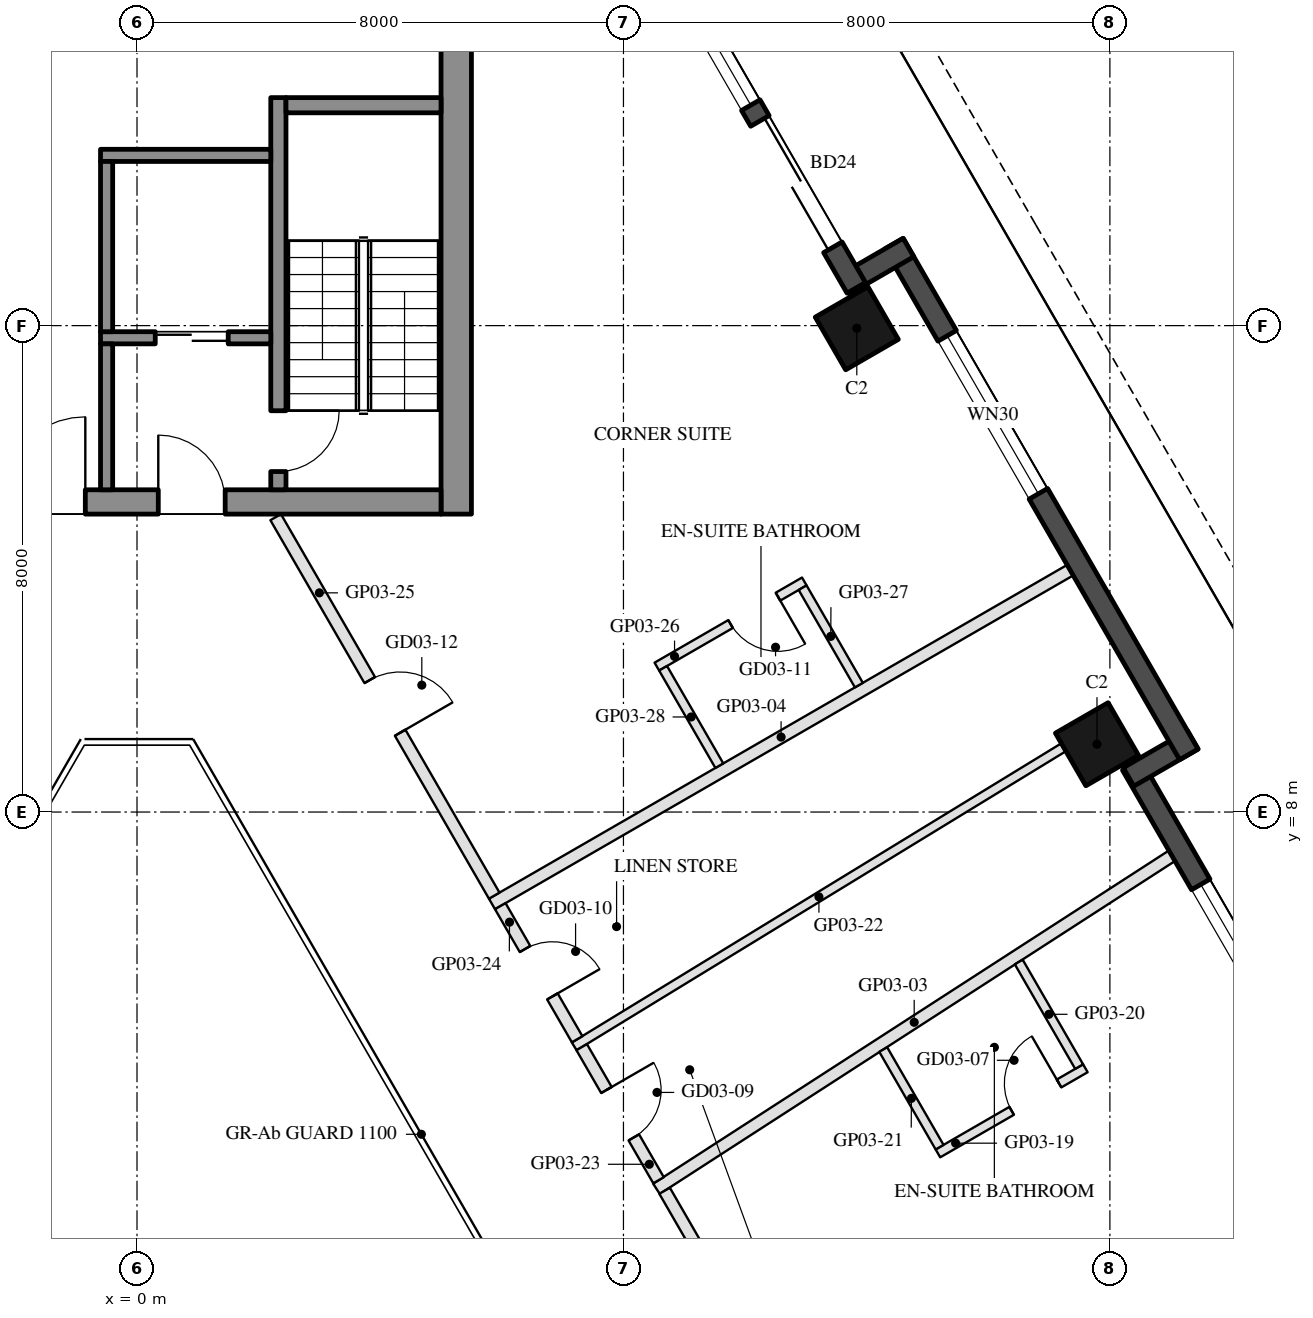
"""IFC4 building model, lengths in metres.
Left out: names, types, materials, properties, quantities, classifications, styles, units other than length and angle.
Written with IfcOpenShell. Run it as: python <this file> out.ifc"""

import sys

from ifc_helpers import new_model, si_unit, direction, frame, frame_2d, origin, origin_2d, place, context, subcontext, project, spatial, rectangle, hollow_rectangle, extrude, element, fill, save


model = new_model("IFC4")
c1 = context("Model", 3, precision=1e-05, world=origin(), true_north=direction((0.0, 1.0)))
c2 = subcontext(c1, "Body", "Model", "MODEL_VIEW")
j1 = project(units=[si_unit("LENGTHUNIT", "METRE"), si_unit("PLANEANGLEUNIT", "RADIAN")], contexts=[c1])
p1 = place(None, origin())
s1 = spatial("IfcSite", under=j1, at=p1, CompositionType="ELEMENT")
p2 = place(p1, origin())
s2 = spatial("IfcBuilding", under=s1, at=p2, CompositionType="ELEMENT")
p3 = place(p2, frame((0.0, 0.0, 61.3)))
s3 = spatial("IfcBuildingStorey", under=s2, at=p3, CompositionType="ELEMENT", Elevation=61.3)
for number, where, z_axis, x_axis in (
    (1, (15.788, 9.115, 0.0), (0.0, 0.0, 1.0), (-0.5, 0.866, 0.0)),
    (2, (11.838, 15.957, 0.0), (0.0, 0.0, 1.0), (-0.5, 0.866, 0.0)),
):
    element("IfcColumn", number, at=place(p3, frame(where, z_axis=z_axis, x_axis=x_axis)), inside=s3, PredefinedType="COLUMN", context=c2, shape_type="SweptSolid", body=[
        extrude(hollow_rectangle(XDim=1.0, YDim=1.0, WallThickness=0.045, at=origin_2d()), origin(), (0.0, 0.0, 1.0), 3.7),
    ])
p4 = place(p3, frame((19.729, 2.938, 0.0), z_axis=(0.0, 0.0, 1.0), x_axis=(-0.499976430342, 0.866039011305, 0.0)))
e3 = element("IfcWall", 3, at=p4, inside=s3, PredefinedType="SOLIDWALL", context=c2, shape_type="SweptSolid", body=[
    extrude(rectangle(XDim=6.74, YDim=0.35, at=frame_2d((3.37, 0.0))), origin(), (0.0, 0.0, 1.0), 3.55),
])
p5 = place(p4, frame((0.77, 0.0, 0.3)))
e4 = element("IfcOpeningElement", 4, at=p5, cuts=e3, PredefinedType="OPENING", context=c2, shape_type="SweptSolid", body=[
    extrude(rectangle(XDim=1.7, YDim=2.65, at=frame_2d((0.85, 1.325))), frame((0.0, 0.185, 0.0), z_axis=(0.0, -1.0, 0.0), x_axis=(1.0, 0.0, 0.0)), (0.0, 0.0, 1.0), 0.37),
])
p6 = place(p4, frame((2.77, 0.0, 0.3)))
e5 = element("IfcOpeningElement", 5, at=p6, cuts=e3, PredefinedType="OPENING", context=c2, shape_type="SweptSolid", body=[
    extrude(rectangle(XDim=1.7, YDim=2.65, at=frame_2d((0.85, 1.325))), frame((0.0, 0.185, 0.0), z_axis=(0.0, -1.0, 0.0), x_axis=(1.0, 0.0, 0.0)), (0.0, 0.0, 1.0), 0.37),
])
p7 = place(p3, frame((16.306, 8.577, 0.0), z_axis=(0.0, 0.0, 1.0), x_axis=(0.866092288191, 0.499884134912, 0.0)))
e6 = element("IfcWall", 6, at=p7, inside=s3, PredefinedType="SOLIDWALL", context=c2, shape_type="SweptSolid", body=[
    extrude(rectangle(XDim=1.22, YDim=0.35, at=frame_2d((0.61, 0.0))), origin(), (0.0, 0.0, 1.0), 3.55),
])
p8 = place(p3, frame((17.299, 8.948, 0.0), z_axis=(0.0, 0.0, 1.0), x_axis=(-0.500010041276, 0.866019606374, 0.0)))
e7 = element("IfcWall", 7, at=p8, inside=s3, PredefinedType="SOLIDWALL", context=c2, shape_type="SweptSolid", body=[
    extrude(rectangle(XDim=9.7, YDim=0.35, at=frame_2d((4.85, 0.0))), origin(), (0.0, 0.0, 1.0), 3.55),
])
p9 = place(p8, frame((4.949, 0.0, 0.3)))
e8 = element("IfcOpeningElement", 8, at=p9, cuts=e7, PredefinedType="OPENING", context=c2, shape_type="SweptSolid", body=[
    extrude(rectangle(XDim=3.0, YDim=2.65, at=frame_2d((1.5, 1.325))), frame((0.0, 0.185, 0.0), z_axis=(0.0, -1.0, 0.0), x_axis=(1.0, 0.0, 0.0)), (0.0, 0.0, 1.0), 0.37),
])
p10 = place(p3, frame((12.688, 17.284, 0.0), z_axis=(0.0, 0.0, 1.0), x_axis=(-0.865955602162, -0.500120880472, 0.0)))
e9 = element("IfcWall", 9, at=p10, inside=s3, PredefinedType="SOLIDWALL", context=c2, shape_type="SweptSolid", body=[
    extrude(rectangle(XDim=1.22, YDim=0.35, at=frame_2d((0.61, 0.0))), origin(), (0.0, 0.0, 1.0), 3.55),
])
p11 = place(p3, frame((11.829, 16.621, 0.0), z_axis=(0.0, 0.0, 1.0), x_axis=(-0.500003597184, 0.866023326939, 0.0)))
e10 = element("IfcWall", 10, at=p11, inside=s3, PredefinedType="SOLIDWALL", context=c2, shape_type="SweptSolid", body=[
    extrude(rectangle(XDim=6.74, YDim=0.35, at=frame_2d((3.37, 0.0))), origin(), (0.0, 0.0, 1.0), 3.55),
])
p12 = place(p11, frame((0.77, 0.0, 0.0)))
e11 = element("IfcOpeningElement", 11, at=p12, cuts=e10, PredefinedType="OPENING", context=c2, shape_type="SweptSolid", body=[
    extrude(rectangle(XDim=2.4, YDim=2.4, at=frame_2d((1.2, 1.2))), frame((0.0, 0.185, 0.0), z_axis=(0.0, -1.0, 0.0), x_axis=(1.0, 0.0, 0.0)), (0.0, 0.0, 1.0), 0.37),
])
p13 = place(p11, frame((3.47, 0.0, 0.3)))
e12 = element("IfcOpeningElement", 12, at=p13, cuts=e10, PredefinedType="OPENING", context=c2, shape_type="SweptSolid", body=[
    extrude(rectangle(XDim=2.9, YDim=2.65, at=frame_2d((1.45, 1.325))), frame((0.0, 0.185, 0.0), z_axis=(0.0, -1.0, 0.0), x_axis=(1.0, 0.0, 0.0)), (0.0, 0.0, 1.0), 0.37),
])
p14 = place(p3, frame((5.25, 12.9, 0.0), z_axis=(0.0, 0.0, 1.0), x_axis=(0.0, 1.0, 0.0)))
e13 = element("IfcWall", 13, at=p14, inside=s3, PredefinedType="SHEAR", context=c2, shape_type="SweptSolid", body=[
    extrude(rectangle(XDim=14.837, YDim=0.5, at=frame_2d((7.418, 0.0))), origin(), (0.0, 0.0, 1.0), 3.5),
])
p15 = place(p3, frame((5.0, 13.1, 0.0), z_axis=(0.0, 0.0, 1.0), x_axis=(-1.0, 0.0, 0.0)))
e14 = element("IfcWall", 14, at=p15, inside=s3, PredefinedType="SHEAR", context=c2, shape_type="SweptSolid", body=[
    extrude(rectangle(XDim=10.0, YDim=0.4, at=frame_2d((5.0, 0.0))), origin(), (0.0, 0.0, 1.0), 3.5),
])
p16 = place(p15, frame((3.55, 0.0, 0.0)))
e15 = element("IfcOpeningElement", 15, at=p16, cuts=e14, PredefinedType="OPENING", context=c2, shape_type="SweptSolid", body=[
    extrude(rectangle(XDim=1.1, YDim=2.1, at=frame_2d((0.55, 1.05))), frame((0.0, 0.21, 0.0), z_axis=(0.0, -1.0, 0.0), x_axis=(1.0, 0.0, 0.0)), (0.0, 0.0, 1.0), 0.42),
])
p17 = place(p15, frame((5.85, 0.0, 0.0)))
e16 = element("IfcOpeningElement", 16, at=p17, cuts=e14, PredefinedType="OPENING", context=c2, shape_type="SweptSolid", body=[
    extrude(rectangle(XDim=1.4, YDim=2.1, at=frame_2d((0.7, 1.05))), frame((0.0, 0.21, 0.0), z_axis=(0.0, -1.0, 0.0), x_axis=(1.0, 0.0, 0.0)), (0.0, 0.0, 1.0), 0.42),
])
p18 = place(p3, frame((2.325, 13.3, 0.0), z_axis=(0.0, 0.0, 1.0), x_axis=(0.0, 1.0, 0.0)))
e17 = element("IfcWall", 17, at=p18, inside=s3, PredefinedType="SHEAR", context=c2, shape_type="SweptSolid", body=[
    extrude(rectangle(XDim=6.45, YDim=0.25, at=frame_2d((3.225, 0.0))), origin(), (0.0, 0.0, 1.0), 3.5),
])
p19 = place(p18, frame((0.3, 0.0, 0.0)))
e18 = element("IfcOpeningElement", 18, at=p19, cuts=e17, PredefinedType="OPENING", context=c2, shape_type="SweptSolid", body=[
    extrude(rectangle(XDim=1.0, YDim=2.1, at=frame_2d((0.5, 1.05))), frame((0.0, 0.135, 0.0), z_axis=(0.0, -1.0, 0.0), x_axis=(1.0, 0.0, 0.0)), (0.0, 0.0, 1.0), 0.27),
])
p20 = place(p3, frame((5.0, 19.625, 0.0), z_axis=(0.0, 0.0, 1.0), x_axis=(-1.0, 0.0, 0.0)))
e19 = element("IfcWall", 19, at=p20, inside=s3, PredefinedType="SHEAR", context=c2, shape_type="SweptSolid", body=[
    extrude(rectangle(XDim=2.55, YDim=0.25, at=frame_2d((1.275, 0.0))), origin(), (0.0, 0.0, 1.0), 3.5),
])
p21 = place(p3, frame((2.2, 18.8, 0.0), z_axis=(0.0, 0.0, 1.0), x_axis=(-1.0, 0.0, 0.0)))
e20 = element("IfcWall", 20, at=p21, inside=s3, PredefinedType="SHEAR", context=c2, shape_type="SweptSolid", body=[
    extrude(rectangle(XDim=2.8, YDim=0.2, at=frame_2d((1.4, 0.0))), origin(), (0.0, 0.0, 1.0), 3.5),
])
p22 = place(p3, frame((2.2, 15.8, 0.0), z_axis=(0.0, 0.0, 1.0), x_axis=(-1.0, 0.0, 0.0)))
e21 = element("IfcWall", 21, at=p22, inside=s3, PredefinedType="SHEAR", context=c2, shape_type="SweptSolid", body=[
    extrude(rectangle(XDim=2.8, YDim=0.2, at=frame_2d((1.4, 0.0))), origin(), (0.0, 0.0, 1.0), 3.5),
])
p23 = place(p22, frame((0.7, 0.0, 0.0)))
e22 = element("IfcOpeningElement", 22, at=p23, cuts=e21, PredefinedType="OPENING", context=c2, shape_type="SweptSolid", body=[
    extrude(rectangle(XDim=1.2, YDim=2.1, at=frame_2d((0.6, 1.05))), frame((0.0, 0.11, 0.0), z_axis=(0.0, -1.0, 0.0), x_axis=(1.0, 0.0, 0.0)), (0.0, 0.0, 1.0), 0.22),
])
p24 = place(p3, frame((-0.5, 15.9, 0.0), z_axis=(0.0, 0.0, 1.0), x_axis=(0.0, 1.0, 0.0)))
e23 = element("IfcWall", 23, at=p24, inside=s3, PredefinedType="SHEAR", context=c2, shape_type="SweptSolid", body=[
    extrude(rectangle(XDim=2.8, YDim=0.2, at=frame_2d((1.4, 0.0))), origin(), (0.0, 0.0, 1.0), 3.5),
])
p25 = place(p3, frame((-0.5, 13.3, 0.0), z_axis=(0.0, 0.0, 1.0), x_axis=(0.0, 1.0, 0.0)))
e24 = element("IfcWall", 24, at=p25, inside=s3, PredefinedType="SHEAR", context=c2, shape_type="SweptSolid", body=[
    extrude(rectangle(XDim=2.4, YDim=0.2, at=frame_2d((1.2, 0.0))), origin(), (0.0, 0.0, 1.0), 3.5),
])
p26 = place(p3, frame((17.02, 7.28, 0.0), z_axis=(0.0, 0.0, 1.0), x_axis=(-0.839924980805, -0.542702521294, 0.0)))
e25 = element("IfcWall", 25, at=p26, inside=s3, PredefinedType="PARTITIONING", context=c2, shape_type="SweptSolid", body=[
    extrude(rectangle(XDim=10.093, YDim=0.2, at=frame_2d((5.046, 0.0))), origin(), (0.0, 0.0, 1.0), 2.96),
])
p27 = place(p3, frame((15.347, 11.978, 0.0), z_axis=(0.0, 0.0, 1.0), x_axis=(-0.866027479907, -0.499996404033, 0.0)))
e26 = element("IfcWall", 26, at=p27, inside=s3, PredefinedType="PARTITIONING", context=c2, shape_type="SweptSolid", body=[
    extrude(rectangle(XDim=10.98, YDim=0.2, at=frame_2d((5.49, 0.0))), origin(), (0.0, 0.0, 1.0), 2.96),
])
p28 = place(p3, frame((8.677, 1.771, 0.0), z_axis=(0.0, 0.0, 1.0), x_axis=(0.50000293509, -0.866023709203, 0.0)))
e27 = element("IfcWall", 27, at=p28, inside=s3, PredefinedType="PARTITIONING", context=c2, shape_type="SweptSolid", body=[
    extrude(rectangle(XDim=7.183, YDim=0.2, at=frame_2d((3.592, 0.0))), origin(), (0.0, 0.0, 1.0), 2.95),
])
p29 = place(p28, frame((3.092, 0.0, 0.0)))
e28 = element("IfcOpeningElement", 28, at=p29, cuts=e27, PredefinedType="OPENING", context=c2, shape_type="SweptSolid", body=[
    extrude(rectangle(XDim=1.0, YDim=2.1, at=frame_2d((0.5, 1.05))), frame((0.0, 0.11, 0.0), z_axis=(0.0, -1.0, 0.0), x_axis=(1.0, 0.0, 0.0)), (0.0, 0.0, 1.0), 0.22),
])
p30 = place(p3, frame((13.172, 2.386, 0.0), z_axis=(0.0, 0.0, 1.0), x_axis=(0.865996816683, 0.500049511043, 0.0)))
e29 = element("IfcWall", 29, at=p30, inside=s3, PredefinedType="PARTITIONING", context=c2, shape_type="SweptSolid", body=[
    extrude(rectangle(XDim=2.8, YDim=0.15, at=frame_2d((1.4, 0.0))), origin(), (0.0, 0.0, 1.0), 3.55),
])
p31 = place(p30, frame((1.4, 0.0, 0.0)))
e30 = element("IfcOpeningElement", 30, at=p31, cuts=e29, PredefinedType="OPENING", context=c2, shape_type="SweptSolid", body=[
    extrude(rectangle(XDim=0.9, YDim=2.1, at=frame_2d((0.45, 1.05))), frame((0.0, 0.085, 0.0), z_axis=(0.0, -1.0, 0.0), x_axis=(1.0, 0.0, 0.0)), (0.0, 0.0, 1.0), 0.17),
])
p32 = place(p3, frame((15.494, 3.813, 0.0), z_axis=(0.0, 0.0, 1.0), x_axis=(-0.499945861543, 0.866056658381, 0.0)))
e31 = element("IfcWall", 31, at=p32, inside=s3, PredefinedType="PARTITIONING", context=c2, shape_type="SweptSolid", body=[
    extrude(rectangle(XDim=1.987, YDim=0.15, at=frame_2d((0.993, 0.0))), origin(), (0.0, 0.0, 1.0), 2.95),
])
p33 = place(p3, frame((13.199, 2.488, 0.0), z_axis=(0.0, 0.0, 1.0), x_axis=(-0.499992292652, 0.866029853578, 0.0)))
e32 = element("IfcWall", 32, at=p33, inside=s3, PredefinedType="PARTITIONING", context=c2, shape_type="SweptSolid", body=[
    extrude(rectangle(XDim=1.854, YDim=0.15, at=frame_2d((0.927, 0.0))), origin(), (0.0, 0.0, 1.0), 2.95),
])
p34 = place(p3, frame((15.239, 9.065, 0.0), z_axis=(0.0, 0.0, 1.0), x_axis=(-0.853241525467, -0.521515962573, 0.0)))
e33 = element("IfcWall", 33, at=p34, inside=s3, PredefinedType="PARTITIONING", context=c2, shape_type="SweptSolid", body=[
    extrude(rectangle(XDim=9.433, YDim=0.15, at=frame_2d((4.716, 0.0))), origin(), (0.0, 0.0, 1.0), 2.95),
])
p35 = place(p3, frame((7.313, 4.133, 0.0), z_axis=(0.0, 0.0, 1.0), x_axis=(0.500003972934, -0.866023109998, 0.0)))
e34 = element("IfcWall", 34, at=p35, inside=s3, PredefinedType="PARTITIONING", context=c2, shape_type="SweptSolid", body=[
    extrude(rectangle(XDim=2.527, YDim=0.2, at=frame_2d((1.264, 0.0))), origin(), (0.0, 0.0, 1.0), 2.95),
])
p36 = place(p35, frame((0.814, 0.0, 0.0)))
e35 = element("IfcOpeningElement", 35, at=p36, cuts=e34, PredefinedType="OPENING", context=c2, shape_type="SweptSolid", body=[
    extrude(rectangle(XDim=0.9, YDim=2.1, at=frame_2d((0.45, 1.05))), frame((0.0, 0.11, 0.0), z_axis=(0.0, -1.0, 0.0), x_axis=(1.0, 0.0, 0.0)), (0.0, 0.0, 1.0), 0.22),
])
p37 = place(p3, frame((5.975, 6.452, 0.0), z_axis=(0.0, 0.0, 1.0), x_axis=(0.499962146402, -0.866047257466, 0.0)))
e36 = element("IfcWall", 36, at=p37, inside=s3, PredefinedType="PARTITIONING", context=c2, shape_type="SweptSolid", body=[
    extrude(rectangle(XDim=2.528, YDim=0.2, at=frame_2d((1.264, 0.0))), origin(), (0.0, 0.0, 1.0), 2.95),
])
p38 = place(p37, frame((0.814, 0.0, 0.0)))
e37 = element("IfcOpeningElement", 37, at=p38, cuts=e36, PredefinedType="OPENING", context=c2, shape_type="SweptSolid", body=[
    extrude(rectangle(XDim=0.9, YDim=2.1, at=frame_2d((0.45, 1.05))), frame((0.0, 0.11, 0.0), z_axis=(0.0, -1.0, 0.0), x_axis=(1.0, 0.0, 0.0)), (0.0, 0.0, 1.0), 0.22),
])
p39 = place(p3, frame((2.281, 12.85, 0.0), z_axis=(0.0, 0.0, 1.0), x_axis=(0.499992939664, -0.866029480033, 0.0)))
e38 = element("IfcWall", 38, at=p39, inside=s3, PredefinedType="PARTITIONING", context=c2, shape_type="SweptSolid", body=[
    extrude(rectangle(XDim=7.188, YDim=0.2, at=frame_2d((3.594, 0.0))), origin(), (0.0, 0.0, 1.0), 2.95),
])
p40 = place(p39, frame((3.094, 0.0, 0.0)))
e39 = element("IfcOpeningElement", 39, at=p40, cuts=e38, PredefinedType="OPENING", context=c2, shape_type="SweptSolid", body=[
    extrude(rectangle(XDim=1.0, YDim=2.1, at=frame_2d((0.5, 1.05))), frame((0.0, 0.11, 0.0), z_axis=(0.0, -1.0, 0.0), x_axis=(1.0, 0.0, 0.0)), (0.0, 0.0, 1.0), 0.22),
])
p41 = place(p3, frame((10.974, 11.792, 0.0), z_axis=(0.0, 0.0, 1.0), x_axis=(-0.866056369097, -0.49994636267, 0.0)))
e40 = element("IfcWall", 40, at=p41, inside=s3, PredefinedType="PARTITIONING", context=c2, shape_type="SweptSolid", body=[
    extrude(rectangle(XDim=2.8, YDim=0.15, at=frame_2d((1.4, 0.0))), origin(), (0.0, 0.0, 1.0), 3.55),
])
p42 = place(p41, frame((0.5, 0.0, 0.0)))
e41 = element("IfcOpeningElement", 41, at=p42, cuts=e40, PredefinedType="OPENING", context=c2, shape_type="SweptSolid", body=[
    extrude(rectangle(XDim=0.9, YDim=2.1, at=frame_2d((0.45, 1.05))), frame((0.0, 0.085, 0.0), z_axis=(0.0, -1.0, 0.0), x_axis=(1.0, 0.0, 0.0)), (0.0, 0.0, 1.0), 0.17),
])
for number, where, z_axis, x_axis in (
    (42, (11.872, 10.087, 0.0), (0.0, 0.0, 1.0), (-0.5, 0.866, 0.0)),
    (43, (9.577, 8.762, 0.0), (0.0, 0.0, 1.0), (-0.5, 0.866, 0.0)),
):
    element("IfcWall", number, at=place(p3, frame(where, z_axis=z_axis, x_axis=x_axis)), inside=s3, PredefinedType="PARTITIONING", context=c2, shape_type="SweptSolid", body=[
        extrude(rectangle(XDim=1.85, YDim=0.15, at=frame_2d((0.925, 0.0))), origin(), (0.0, 0.0, 1.0), 2.95),
    ])
p43 = place(p6, origin())
e44 = element("IfcWindow", 44, at=p43, inside=s3, PartitioningType="SINGLE_PANEL", PredefinedType="WINDOW", context=c2, shape_type="SweptSolid", body=[
    extrude(rectangle(XDim=1.7, YDim=2.65, at=frame_2d((0.85, 1.325))), frame((0.0, 0.03, 0.0), z_axis=(0.0, -1.0, 0.0), x_axis=(1.0, 0.0, 0.0)), (0.0, 0.0, 1.0), 0.06),
])
fill(e5, e44)
p44 = place(p9, origin())
e45 = element("IfcWindow", 45, at=p44, inside=s3, PartitioningType="SINGLE_PANEL", PredefinedType="WINDOW", context=c2, shape_type="SweptSolid", body=[
    extrude(rectangle(XDim=3.0, YDim=2.65, at=frame_2d((1.5, 1.325))), frame((0.0, 0.03, 0.0), z_axis=(0.0, -1.0, 0.0), x_axis=(1.0, 0.0, 0.0)), (0.0, 0.0, 1.0), 0.06),
])
fill(e8, e45)
p45 = place(p12, frame((2.4, 0.0, 0.0), z_axis=(0.0, 0.0, 1.0), x_axis=(-1.0, 0.0, 0.0)))
e46 = element("IfcDoor", 46, at=p45, inside=s3, OperationType="SLIDING_TO_LEFT", PredefinedType="DOOR", context=c2, shape_type="SweptSolid", body=[
    extrude(rectangle(XDim=2.4, YDim=2.4, at=frame_2d((1.2, 1.2))), frame((0.0, 0.025, 0.0), z_axis=(0.0, -1.0, 0.0), x_axis=(1.0, 0.0, 0.0)), (0.0, 0.0, 1.0), 0.05),
])
fill(e11, e46)
p46 = place(p13, origin())
e47 = element("IfcWindow", 47, at=p46, inside=s3, PartitioningType="SINGLE_PANEL", PredefinedType="WINDOW", context=c2, shape_type="SweptSolid", body=[
    extrude(rectangle(XDim=2.9, YDim=2.65, at=frame_2d((1.45, 1.325))), frame((0.0, 0.03, 0.0), z_axis=(0.0, -1.0, 0.0), x_axis=(1.0, 0.0, 0.0)), (0.0, 0.0, 1.0), 0.06),
])
fill(e12, e47)
p47 = place(p23, origin())
e48 = element("IfcDoor", 48, at=p47, inside=s3, OperationType="DOUBLE_DOOR_SLIDING", PredefinedType="DOOR", context=c2, shape_type="SweptSolid", body=[
    extrude(rectangle(XDim=1.2, YDim=2.1, at=frame_2d((0.6, 1.05))), frame((0.0, 0.025, 0.0), z_axis=(0.0, -1.0, 0.0), x_axis=(1.0, 0.0, 0.0)), (0.0, 0.0, 1.0), 0.05),
])
fill(e22, e48)
p48 = place(p16, frame((1.1, 0.0, 0.0), z_axis=(0.0, 0.0, 1.0), x_axis=(-1.0, 0.0, 0.0)))
e49 = element("IfcDoor", 49, at=p48, inside=s3, OperationType="SINGLE_SWING_LEFT", PredefinedType="DOOR", context=c2, shape_type="SweptSolid", body=[
    extrude(rectangle(XDim=1.1, YDim=2.1, at=frame_2d((0.55, 1.05))), frame((0.0, 0.025, 0.0), z_axis=(0.0, -1.0, 0.0), x_axis=(1.0, 0.0, 0.0)), (0.0, 0.0, 1.0), 0.05),
])
fill(e15, e49)
p49 = place(p17, frame((1.4, 0.0, 0.0), z_axis=(0.0, 0.0, 1.0), x_axis=(-1.0, 0.0, 0.0)))
e50 = element("IfcDoor", 50, at=p49, inside=s3, OperationType="DOUBLE_DOOR_SINGLE_SWING", PredefinedType="DOOR", context=c2, shape_type="SweptSolid", body=[
    extrude(rectangle(XDim=1.4, YDim=2.1, at=frame_2d((0.7, 1.05))), frame((0.0, 0.025, 0.0), z_axis=(0.0, -1.0, 0.0), x_axis=(1.0, 0.0, 0.0)), (0.0, 0.0, 1.0), 0.05),
])
fill(e16, e50)
p50 = place(p19, frame((1.0, 0.0, 0.0), z_axis=(0.0, 0.0, 1.0), x_axis=(-1.0, 0.0, 0.0)))
e51 = element("IfcDoor", 51, at=p50, inside=s3, OperationType="SINGLE_SWING_LEFT", PredefinedType="DOOR", context=c2, shape_type="SweptSolid", body=[
    extrude(rectangle(XDim=1.0, YDim=2.1, at=frame_2d((0.5, 1.05))), frame((0.0, 0.025, 0.0), z_axis=(0.0, -1.0, 0.0), x_axis=(1.0, 0.0, 0.0)), (0.0, 0.0, 1.0), 0.05),
])
fill(e18, e51)
p51 = place(p31, origin())
e52 = element("IfcDoor", 52, at=p51, inside=s3, OperationType="SINGLE_SWING_RIGHT", PredefinedType="DOOR", context=c2, shape_type="SweptSolid", body=[
    extrude(rectangle(XDim=0.9, YDim=2.1, at=frame_2d((0.45, 1.05))), frame((0.0, 0.025, 0.0), z_axis=(0.0, -1.0, 0.0), x_axis=(1.0, 0.0, 0.0)), (0.0, 0.0, 1.0), 0.05),
])
fill(e30, e52)
p52 = place(p36, origin())
e53 = element("IfcDoor", 53, at=p52, inside=s3, OperationType="SINGLE_SWING_LEFT", PredefinedType="DOOR", context=c2, shape_type="SweptSolid", body=[
    extrude(rectangle(XDim=0.9, YDim=2.1, at=frame_2d((0.45, 1.05))), frame((0.0, 0.025, 0.0), z_axis=(0.0, -1.0, 0.0), x_axis=(1.0, 0.0, 0.0)), (0.0, 0.0, 1.0), 0.05),
])
fill(e35, e53)
p53 = place(p38, origin())
e54 = element("IfcDoor", 54, at=p53, inside=s3, OperationType="SINGLE_SWING_RIGHT", PredefinedType="DOOR", context=c2, shape_type="SweptSolid", body=[
    extrude(rectangle(XDim=0.9, YDim=2.1, at=frame_2d((0.45, 1.05))), frame((0.0, 0.025, 0.0), z_axis=(0.0, -1.0, 0.0), x_axis=(1.0, 0.0, 0.0)), (0.0, 0.0, 1.0), 0.05),
])
fill(e37, e54)
p54 = place(p42, origin())
e55 = element("IfcDoor", 55, at=p54, inside=s3, OperationType="SINGLE_SWING_LEFT", PredefinedType="DOOR", context=c2, shape_type="SweptSolid", body=[
    extrude(rectangle(XDim=0.9, YDim=2.1, at=frame_2d((0.45, 1.05))), frame((0.0, 0.025, 0.0), z_axis=(0.0, -1.0, 0.0), x_axis=(1.0, 0.0, 0.0)), (0.0, 0.0, 1.0), 0.05),
])
fill(e41, e55)
p55 = place(p40, origin())
e56 = element("IfcDoor", 56, at=p55, inside=s3, OperationType="SINGLE_SWING_RIGHT", PredefinedType="DOOR", context=c2, shape_type="SweptSolid", body=[
    extrude(rectangle(XDim=1.0, YDim=2.1, at=frame_2d((0.5, 1.05))), frame((0.0, 0.025, 0.0), z_axis=(0.0, -1.0, 0.0), x_axis=(1.0, 0.0, 0.0)), (0.0, 0.0, 1.0), 0.05),
])
fill(e39, e56)
save(model, sys.argv[1])
